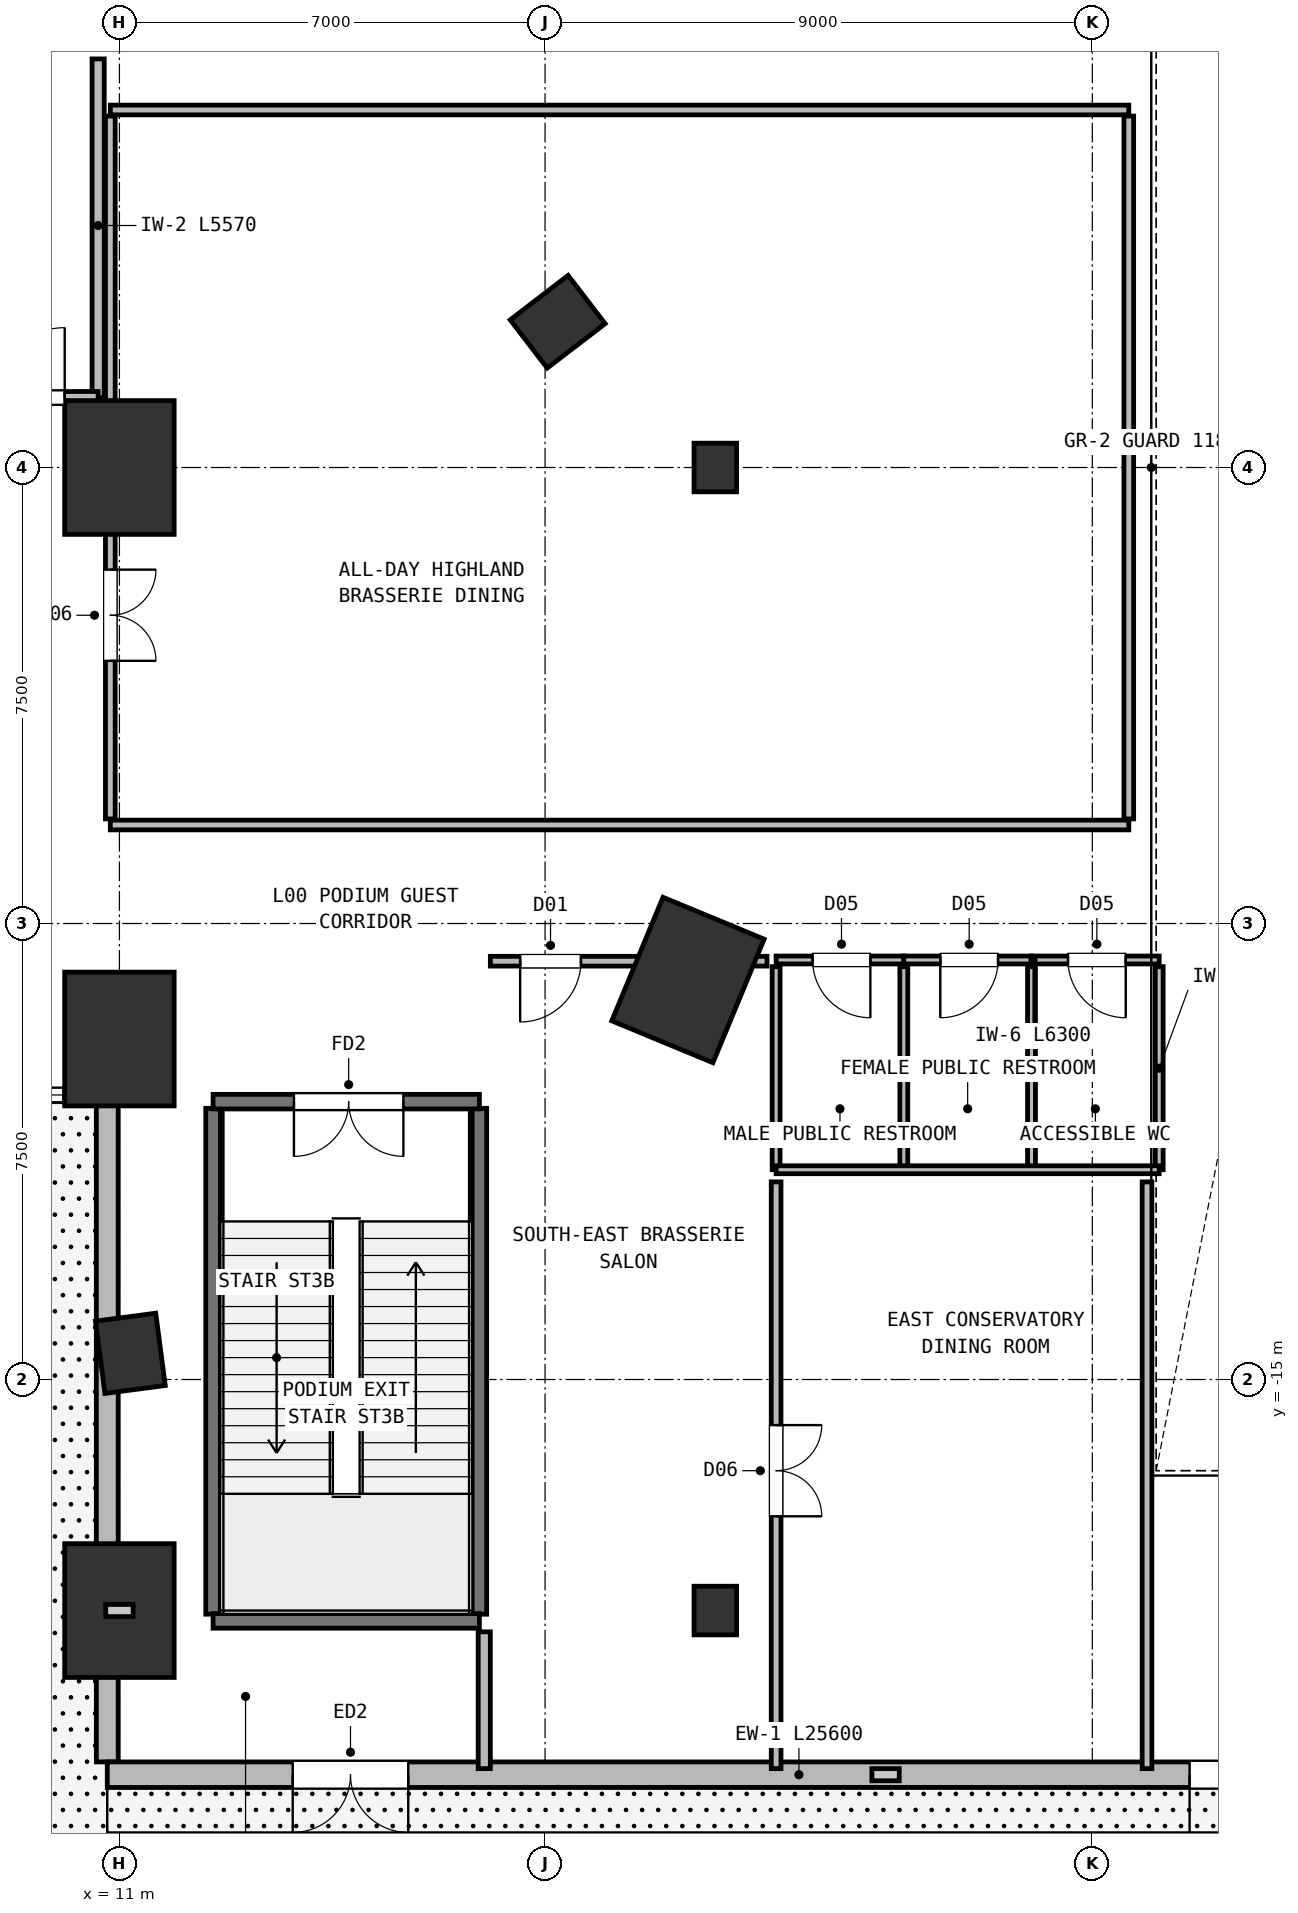
"""IFC4 building model, lengths in metres.
Left out: names, types, materials, properties, quantities, classifications, styles, units other than length and angle.
Written with IfcOpenShell. Run it as: python <this file> out.ifc"""

import sys

from ifc_helpers import new_model, si_unit, direction, frame, frame_2d, origin, origin_2d, place, context, subcontext, project, spatial, rectangle, extrude, element, fill, save


model = new_model("IFC4")
c1 = context("Model", 3, precision=1e-05, world=origin(), true_north=direction((0.0, 1.0)))
c2 = subcontext(c1, "Body", "Model", "MODEL_VIEW")
j1 = project(units=[si_unit("LENGTHUNIT", "METRE"), si_unit("PLANEANGLEUNIT", "RADIAN")], contexts=[c1])
p1 = place(None, origin())
s1 = spatial("IfcSite", under=j1, at=p1, CompositionType="ELEMENT")
p2 = place(p1, origin())
s2 = spatial("IfcBuilding", under=s1, at=p2, CompositionType="ELEMENT")
p3 = place(p2, origin())
s3 = spatial("IfcBuildingStorey", under=s2, at=p3, CompositionType="ELEMENT", Elevation=0.0)
p4 = place(p3, frame((11.179, -14.569, 0.0), z_axis=(0.0, 0.0, 1.0), x_axis=(0.991444861374, 0.13052619222, 0.0)))
e1 = element("IfcColumn", 1, at=p4, inside=s3, PredefinedType="COLUMN", context=c2, shape_type="SweptSolid", body=[
    extrude(rectangle(XDim=1.0, YDim=1.2, at=origin_2d()), origin(), (0.0, 0.0, 1.0), 6.0),
])
p5 = place(p3, frame((20.35, -8.429, 0.0), z_axis=(0.0, 0.0, 1.0), x_axis=(-0.923879532511, 0.382683432365, 0.0)))
e2 = element("IfcColumn", 2, at=p5, inside=s3, PredefinedType="COLUMN", context=c2, shape_type="SweptSolid", body=[
    extrude(rectangle(XDim=1.8, YDim=2.2, at=origin_2d()), origin(), (0.0, 0.0, 1.0), 6.0),
])
p6 = place(p3, frame((18.207, 2.397, 0.0), z_axis=(0.0, 0.0, 1.0), x_axis=(-0.608761429009, 0.793353340291, 0.0)))
e3 = element("IfcColumn", 3, at=p6, inside=s3, PredefinedType="COLUMN", context=c2, shape_type="SweptSolid", body=[
    extrude(rectangle(XDim=1.0, YDim=1.2, at=origin_2d()), origin(), (0.0, 0.0, 1.0), 6.0),
])
for number, where, z_axis, x_axis in (
    (4, (11.0, -18.8, 0.0), (0.0, 0.0, 1.0), (1.0, 0.0, 0.0)),
    (5, (11.0, -9.4, 0.0), (0.0, 0.0, 1.0), (1.0, 0.0, 0.0)),
    (6, (11.0, 0.0, 0.0), (0.0, 0.0, 1.0), (1.0, 0.0, 0.0)),
):
    element("IfcColumn", number, at=place(p3, frame(where, z_axis=z_axis, x_axis=x_axis)), inside=s3, PredefinedType="COLUMN", context=c2, shape_type="SweptSolid", body=[
        extrude(rectangle(XDim=1.8, YDim=2.2, at=origin_2d()), origin(), (0.0, 0.0, 1.0), 6.0),
    ])
for number, where, z_axis, x_axis in (
    (7, (20.8, -18.8, 0.0), (0.0, 0.0, 1.0), (1.0, 0.0, 0.0)),
    (8, (20.8, 0.0, 0.0), (0.0, 0.0, 1.0), (1.0, 0.0, 0.0)),
):
    element("IfcColumn", number, at=place(p3, frame(where, z_axis=z_axis, x_axis=x_axis)), inside=s3, PredefinedType="COLUMN", context=c2, shape_type="SweptSolid", body=[
        extrude(rectangle(XDim=0.7, YDim=0.8, at=origin_2d()), origin(), (0.0, 0.0, 1.0), 6.0),
    ])
p7 = place(p3, frame((10.8, -10.32, 0.0), z_axis=(0.0, 0.0, 1.0), x_axis=(0.0, -1.0, 0.0)))
e9 = element("IfcWall", 9, at=p7, inside=s3, PredefinedType="SOLIDWALL", context=c2, shape_type="SweptSolid", body=[
    extrude(rectangle(XDim=10.97, YDim=0.36, at=frame_2d((5.485, 0.0))), origin(), (0.0, 0.0, 1.0), 5.1),
])
p8 = place(p3, frame((36.4, -21.5, 0.0), z_axis=(0.0, 0.0, 1.0), x_axis=(-1.0, 0.0, 0.0)))
e10 = element("IfcWall", 10, at=p8, inside=s3, PredefinedType="SOLIDWALL", context=c2, shape_type="SweptSolid", body=[
    extrude(rectangle(XDim=25.6, YDim=0.42, at=frame_2d((12.8, 0.0))), origin(), (0.0, 0.0, 1.0), 5.72),
])
p9 = place(p8, frame((5.4, 0.0, 0.0)))
e11 = element("IfcOpeningElement", 11, at=p9, cuts=e10, PredefinedType="OPENING", context=c2, shape_type="SweptSolid", body=[
    extrude(rectangle(XDim=2.4, YDim=2.65, at=frame_2d((1.2, 1.325))), frame((0.0, 0.22, 0.0), z_axis=(0.0, -1.0, 0.0), x_axis=(1.0, 0.0, 0.0)), (0.0, 0.0, 1.0), 0.44),
])
p10 = place(p8, frame((20.65, 0.0, 0.0)))
e12 = element("IfcOpeningElement", 12, at=p10, cuts=e10, PredefinedType="OPENING", context=c2, shape_type="SweptSolid", body=[
    extrude(rectangle(XDim=1.9, YDim=2.35, at=frame_2d((0.95, 1.175))), frame((0.0, 0.22, 0.0), z_axis=(0.0, -1.0, 0.0), x_axis=(1.0, 0.0, 0.0)), (0.0, 0.0, 1.0), 0.44),
])
for number, where, z_axis, x_axis in (
    (13, (12.54, -18.86, 0.0), (0.0, 0.0, 1.0), (0.0, 1.0, 0.0)),
    (14, (16.92, -18.86, 0.0), (0.0, 0.0, 1.0), (0.0, 1.0, 0.0)),
):
    element("IfcWall", number, at=place(p3, frame(where, z_axis=z_axis, x_axis=x_axis)), inside=s3, PredefinedType="SHEAR", context=c2, shape_type="SweptSolid", body=[
        extrude(rectangle(XDim=8.32, YDim=0.24, at=frame_2d((4.16, 0.0))), origin(), (0.0, 0.0, 1.0), 5.72),
    ])
p11 = place(p3, frame((12.54, -18.97, 0.0), z_axis=(0.0, 0.0, 1.0), x_axis=(1.0, 0.0, 0.0)))
e15 = element("IfcWall", 15, at=p11, inside=s3, PredefinedType="SHEAR", context=c2, shape_type="SweptSolid", body=[
    extrude(rectangle(XDim=4.38, YDim=0.24, at=frame_2d((2.19, 0.0))), origin(), (0.0, 0.0, 1.0), 5.72),
])
p12 = place(p3, frame((16.92, -10.43, 0.0), z_axis=(0.0, 0.0, 1.0), x_axis=(-1.0, 0.0, 0.0)))
e16 = element("IfcWall", 16, at=p12, inside=s3, PredefinedType="SHEAR", context=c2, shape_type="SweptSolid", body=[
    extrude(rectangle(XDim=4.38, YDim=0.24, at=frame_2d((2.19, 0.0))), origin(), (0.0, 0.0, 1.0), 5.72),
])
p13 = place(p12, frame((1.25, 0.0, 0.0)))
e17 = element("IfcOpeningElement", 17, at=p13, cuts=e16, PredefinedType="OPENING", context=c2, shape_type="SweptSolid", body=[
    extrude(rectangle(XDim=1.8, YDim=2.2, at=frame_2d((0.9, 1.1))), frame((0.0, 0.13, 0.0), z_axis=(0.0, -1.0, 0.0), x_axis=(1.0, 0.0, 0.0)), (0.0, 0.0, 1.0), 0.26),
])
p14 = place(p3, frame((23.9, -8.1, 0.0), z_axis=(0.0, 0.0, 1.0), x_axis=(-1.0, 0.0, 0.0)))
e18 = element("IfcWall", 18, at=p14, inside=s3, PredefinedType="PARTITIONING", context=c2, shape_type="SweptSolid", body=[
    extrude(rectangle(XDim=2.1, YDim=0.13, at=frame_2d((1.05, 0.0))), origin(), (0.0, 0.0, 1.0), 5.72),
])
p15 = place(p14, frame((0.55, 0.0, 0.0)))
e19 = element("IfcOpeningElement", 19, at=p15, cuts=e18, PredefinedType="OPENING", context=c2, shape_type="SweptSolid", body=[
    extrude(rectangle(XDim=0.95, YDim=2.1, at=frame_2d((0.475, 1.05))), frame((0.0, 0.075, 0.0), z_axis=(0.0, -1.0, 0.0), x_axis=(1.0, 0.0, 0.0)), (0.0, 0.0, 1.0), 0.15),
])
p16 = place(p3, frame((21.8, -11.55, 0.0), z_axis=(0.0, 0.0, 1.0), x_axis=(0.0, 1.0, 0.0)))
e20 = element("IfcWall", 20, at=p16, inside=s3, PredefinedType="PARTITIONING", context=c2, shape_type="SweptSolid", body=[
    extrude(rectangle(XDim=3.34, YDim=0.13, at=frame_2d((1.67, 0.0))), origin(), (0.0, 0.0, 1.0), 5.72),
])
p17 = place(p3, frame((26.0, -8.1, 0.0), z_axis=(0.0, 0.0, 1.0), x_axis=(-1.0, 0.0, 0.0)))
e21 = element("IfcWall", 21, at=p17, inside=s3, PredefinedType="PARTITIONING", context=c2, shape_type="SweptSolid", body=[
    extrude(rectangle(XDim=2.1, YDim=0.13, at=frame_2d((1.05, 0.0))), origin(), (0.0, 0.0, 1.0), 5.72),
])
p18 = place(p17, frame((0.55, 0.0, 0.0)))
e22 = element("IfcOpeningElement", 22, at=p18, cuts=e21, PredefinedType="OPENING", context=c2, shape_type="SweptSolid", body=[
    extrude(rectangle(XDim=0.95, YDim=2.1, at=frame_2d((0.475, 1.05))), frame((0.0, 0.075, 0.0), z_axis=(0.0, -1.0, 0.0), x_axis=(1.0, 0.0, 0.0)), (0.0, 0.0, 1.0), 0.15),
])
p19 = place(p3, frame((23.9, -11.55, 0.0), z_axis=(0.0, 0.0, 1.0), x_axis=(0.0, 1.0, 0.0)))
e23 = element("IfcWall", 23, at=p19, inside=s3, PredefinedType="PARTITIONING", context=c2, shape_type="SweptSolid", body=[
    extrude(rectangle(XDim=3.34, YDim=0.13, at=frame_2d((1.67, 0.0))), origin(), (0.0, 0.0, 1.0), 5.72),
])
p20 = place(p3, frame((28.1, -8.1, 0.0), z_axis=(0.0, 0.0, 1.0), x_axis=(-1.0, 0.0, 0.0)))
e24 = element("IfcWall", 24, at=p20, inside=s3, PredefinedType="PARTITIONING", context=c2, shape_type="SweptSolid", body=[
    extrude(rectangle(XDim=2.1, YDim=0.13, at=frame_2d((1.05, 0.0))), origin(), (0.0, 0.0, 1.0), 5.72),
])
p21 = place(p20, frame((0.55, 0.0, 0.0)))
e25 = element("IfcOpeningElement", 25, at=p21, cuts=e24, PredefinedType="OPENING", context=c2, shape_type="SweptSolid", body=[
    extrude(rectangle(XDim=0.95, YDim=2.1, at=frame_2d((0.475, 1.05))), frame((0.0, 0.075, 0.0), z_axis=(0.0, -1.0, 0.0), x_axis=(1.0, 0.0, 0.0)), (0.0, 0.0, 1.0), 0.15),
])
for number, where, z_axis, x_axis in (
    (26, (26.0, -11.55, 0.0), (0.0, 0.0, 1.0), (0.0, 1.0, 0.0)),
    (27, (28.1, -11.55, 0.0), (0.0, 0.0, 1.0), (0.0, 1.0, 0.0)),
):
    element("IfcWall", number, at=place(p3, frame(where, z_axis=z_axis, x_axis=x_axis)), inside=s3, PredefinedType="PARTITIONING", context=c2, shape_type="SweptSolid", body=[
        extrude(rectangle(XDim=3.34, YDim=0.13, at=frame_2d((1.67, 0.0))), origin(), (0.0, 0.0, 1.0), 5.72),
    ])
p22 = place(p3, frame((21.8, -11.55, 0.0), z_axis=(0.0, 0.0, 1.0), x_axis=(1.0, 0.0, 0.0)))
e28 = element("IfcWall", 28, at=p22, inside=s3, PredefinedType="PARTITIONING", context=c2, shape_type="SweptSolid", body=[
    extrude(rectangle(XDim=6.3, YDim=0.13, at=frame_2d((3.15, 0.0))), origin(), (0.0, 0.0, 1.0), 5.72),
])
for number, where, z_axis, x_axis in (
    (29, (27.6, 5.88, 0.0), (0.0, 0.0, 1.0), (-1.0, 0.0, 0.0)),
    (30, (10.85, -5.88, 0.0), (0.0, 0.0, 1.0), (1.0, 0.0, 0.0)),
):
    element("IfcWall", number, at=place(p3, frame(where, z_axis=z_axis, x_axis=x_axis)), inside=s3, PredefinedType="PARTITIONING", context=c2, shape_type="SweptSolid", body=[
        extrude(rectangle(XDim=16.75, YDim=0.16, at=frame_2d((8.375, 0.0))), origin(), (0.0, 0.0, 1.0), 5.72),
    ])
p23 = place(p3, frame((10.85, 5.78, 0.0), z_axis=(0.0, 0.0, 1.0), x_axis=(0.0, -1.0, 0.0)))
e31 = element("IfcWall", 31, at=p23, inside=s3, PredefinedType="PARTITIONING", context=c2, shape_type="SweptSolid", body=[
    extrude(rectangle(XDim=11.56, YDim=0.16, at=frame_2d((5.78, 0.0))), origin(), (0.0, 0.0, 1.0), 5.1),
])
p24 = place(p23, frame((7.46, 0.0, 0.0)))
e32 = element("IfcOpeningElement", 32, at=p24, cuts=e31, PredefinedType="OPENING", context=c2, shape_type="SweptSolid", body=[
    extrude(rectangle(XDim=1.5, YDim=2.2, at=frame_2d((0.75, 1.1))), frame((0.0, 0.09, 0.0), z_axis=(0.0, -1.0, 0.0), x_axis=(1.0, 0.0, 0.0)), (0.0, 0.0, 1.0), 0.18),
])
p25 = place(p3, frame((27.6, -5.78, 0.0), z_axis=(0.0, 0.0, 1.0), x_axis=(0.0, 1.0, 0.0)))
e33 = element("IfcWall", 33, at=p25, inside=s3, PredefinedType="PARTITIONING", context=c2, shape_type="SweptSolid", body=[
    extrude(rectangle(XDim=11.56, YDim=0.16, at=frame_2d((5.78, 0.0))), origin(), (0.0, 0.0, 1.0), 5.72),
])
p26 = place(p3, frame((21.8, -11.75, 0.0), z_axis=(0.0, 0.0, 1.0), x_axis=(0.0, -1.0, 0.0)))
e34 = element("IfcWall", 34, at=p26, inside=s3, PredefinedType="PARTITIONING", context=c2, shape_type="SweptSolid", body=[
    extrude(rectangle(XDim=9.65, YDim=0.16, at=frame_2d((4.825, 0.0))), origin(), (0.0, 0.0, 1.0), 5.72),
])
p27 = place(p26, frame((4.0, 0.0, 0.0)))
e35 = element("IfcOpeningElement", 35, at=p27, cuts=e34, PredefinedType="OPENING", context=c2, shape_type="SweptSolid", body=[
    extrude(rectangle(XDim=1.5, YDim=2.2, at=frame_2d((0.75, 1.1))), frame((0.0, 0.09, 0.0), z_axis=(0.0, -1.0, 0.0), x_axis=(1.0, 0.0, 0.0)), (0.0, 0.0, 1.0), 0.18),
])
p28 = place(p3, frame((27.9, -21.4, 0.0), z_axis=(0.0, 0.0, 1.0), x_axis=(0.0, 1.0, 0.0)))
e36 = element("IfcWall", 36, at=p28, inside=s3, PredefinedType="PARTITIONING", context=c2, shape_type="SweptSolid", body=[
    extrude(rectangle(XDim=9.65, YDim=0.16, at=frame_2d((4.825, 0.0))), origin(), (0.0, 0.0, 1.0), 5.72),
])
p29 = place(p3, frame((21.65, -8.12, 0.0), z_axis=(0.0, 0.0, 1.0), x_axis=(-1.0, 0.0, 0.0)))
e37 = element("IfcWall", 37, at=p29, inside=s3, PredefinedType="PARTITIONING", context=c2, shape_type="SweptSolid", body=[
    extrude(rectangle(XDim=4.55, YDim=0.16, at=frame_2d((2.275, 0.0))), origin(), (0.0, 0.0, 1.0), 5.15),
])
p30 = place(p29, frame((3.06, 0.0, 0.0)))
e38 = element("IfcOpeningElement", 38, at=p30, cuts=e37, PredefinedType="OPENING", context=c2, shape_type="SweptSolid", body=[
    extrude(rectangle(XDim=1.0, YDim=2.15, at=frame_2d((0.5, 1.075))), frame((0.0, 0.09, 0.0), z_axis=(0.0, -1.0, 0.0), x_axis=(1.0, 0.0, 0.0)), (0.0, 0.0, 1.0), 0.18),
])
p31 = place(p3, frame((17.0, -21.4, 0.0), z_axis=(0.0, 0.0, 1.0), x_axis=(0.0, 1.0, 0.0)))
e39 = element("IfcWall", 39, at=p31, inside=s3, PredefinedType="PARTITIONING", context=c2, shape_type="SweptSolid", body=[
    extrude(rectangle(XDim=2.25, YDim=0.2, at=frame_2d((1.125, 0.0))), origin(), (0.0, 0.0, 1.0), 5.72),
])
p32 = place(p3, frame((10.65, 1.15, 0.0), z_axis=(0.0, 0.0, 1.0), x_axis=(0.0, 1.0, 0.0)))
e40 = element("IfcWall", 40, at=p32, inside=s3, PredefinedType="PARTITIONING", context=c2, shape_type="SweptSolid", body=[
    extrude(rectangle(XDim=5.57, YDim=0.2, at=frame_2d((2.785, 0.0))), origin(), (0.0, 0.0, 1.0), 5.72),
])
p33 = place(p3, frame((8.4, 1.15, 0.0), z_axis=(0.0, 0.0, 1.0), x_axis=(1.0, 0.0, 0.0)))
e41 = element("IfcWall", 41, at=p33, inside=s3, PredefinedType="PARTITIONING", context=c2, shape_type="SweptSolid", body=[
    extrude(rectangle(XDim=2.25, YDim=0.2, at=frame_2d((1.125, 0.0))), origin(), (0.0, 0.0, 1.0), 5.72),
])
p34 = place(p33, frame((0.55, 0.0, 0.0)))
e42 = element("IfcOpeningElement", 42, at=p34, cuts=e41, PredefinedType="OPENING", context=c2, shape_type="SweptSolid", body=[
    extrude(rectangle(XDim=1.15, YDim=2.15, at=frame_2d((0.575, 1.075))), frame((0.0, 0.11, 0.0), z_axis=(0.0, -1.0, 0.0), x_axis=(1.0, 0.0, 0.0)), (0.0, 0.0, 1.0), 0.22),
])
p35 = place(p9, origin())
e43 = element("IfcDoor", 43, at=p35, inside=s3, OperationType="DOUBLE_DOOR_SINGLE_SWING", PredefinedType="DOOR", context=c2, shape_type="SweptSolid", body=[
    extrude(rectangle(XDim=2.4, YDim=2.65, at=frame_2d((1.2, 1.325))), frame((0.0, 0.025, 0.0), z_axis=(0.0, -1.0, 0.0), x_axis=(1.0, 0.0, 0.0)), (0.0, 0.0, 1.0), 0.05),
])
fill(e11, e43)
p36 = place(p10, origin())
e44 = element("IfcDoor", 44, at=p36, inside=s3, OperationType="DOUBLE_DOOR_SINGLE_SWING", PredefinedType="DOOR", context=c2, shape_type="SweptSolid", body=[
    extrude(rectangle(XDim=1.9, YDim=2.35, at=frame_2d((0.95, 1.175))), frame((0.0, 0.025, 0.0), z_axis=(0.0, -1.0, 0.0), x_axis=(1.0, 0.0, 0.0)), (0.0, 0.0, 1.0), 0.05),
])
fill(e12, e44)
p37 = place(p13, origin())
e45 = element("IfcDoor", 45, at=p37, inside=s3, OperationType="DOUBLE_DOOR_SINGLE_SWING", PredefinedType="DOOR", context=c2, shape_type="SweptSolid", body=[
    extrude(rectangle(XDim=1.8, YDim=2.2, at=frame_2d((0.9, 1.1))), frame((0.0, 0.025, 0.0), z_axis=(0.0, -1.0, 0.0), x_axis=(1.0, 0.0, 0.0)), (0.0, 0.0, 1.0), 0.05),
])
fill(e17, e45)
p38 = place(p15, origin())
e46 = element("IfcDoor", 46, at=p38, inside=s3, OperationType="SINGLE_SWING_LEFT", PredefinedType="DOOR", context=c2, shape_type="SweptSolid", body=[
    extrude(rectangle(XDim=0.95, YDim=2.1, at=frame_2d((0.475, 1.05))), frame((0.0, 0.025, 0.0), z_axis=(0.0, -1.0, 0.0), x_axis=(1.0, 0.0, 0.0)), (0.0, 0.0, 1.0), 0.05),
])
fill(e19, e46)
p39 = place(p18, origin())
e47 = element("IfcDoor", 47, at=p39, inside=s3, OperationType="SINGLE_SWING_RIGHT", PredefinedType="DOOR", context=c2, shape_type="SweptSolid", body=[
    extrude(rectangle(XDim=0.95, YDim=2.1, at=frame_2d((0.475, 1.05))), frame((0.0, 0.025, 0.0), z_axis=(0.0, -1.0, 0.0), x_axis=(1.0, 0.0, 0.0)), (0.0, 0.0, 1.0), 0.05),
])
fill(e22, e47)
p40 = place(p21, origin())
e48 = element("IfcDoor", 48, at=p40, inside=s3, OperationType="SINGLE_SWING_LEFT", PredefinedType="DOOR", context=c2, shape_type="SweptSolid", body=[
    extrude(rectangle(XDim=0.95, YDim=2.1, at=frame_2d((0.475, 1.05))), frame((0.0, 0.025, 0.0), z_axis=(0.0, -1.0, 0.0), x_axis=(1.0, 0.0, 0.0)), (0.0, 0.0, 1.0), 0.05),
])
fill(e25, e48)
p41 = place(p24, origin())
e49 = element("IfcDoor", 49, at=p41, inside=s3, OperationType="DOUBLE_DOOR_SINGLE_SWING", PredefinedType="DOOR", context=c2, shape_type="SweptSolid", body=[
    extrude(rectangle(XDim=1.5, YDim=2.2, at=frame_2d((0.75, 1.1))), frame((0.0, 0.025, 0.0), z_axis=(0.0, -1.0, 0.0), x_axis=(1.0, 0.0, 0.0)), (0.0, 0.0, 1.0), 0.05),
])
fill(e32, e49)
p42 = place(p27, origin())
e50 = element("IfcDoor", 50, at=p42, inside=s3, OperationType="DOUBLE_DOOR_SINGLE_SWING", PredefinedType="DOOR", context=c2, shape_type="SweptSolid", body=[
    extrude(rectangle(XDim=1.5, YDim=2.2, at=frame_2d((0.75, 1.1))), frame((0.0, 0.025, 0.0), z_axis=(0.0, -1.0, 0.0), x_axis=(1.0, 0.0, 0.0)), (0.0, 0.0, 1.0), 0.05),
])
fill(e35, e50)
p43 = place(p30, origin())
e51 = element("IfcDoor", 51, at=p43, inside=s3, OperationType="SINGLE_SWING_RIGHT", PredefinedType="DOOR", context=c2, shape_type="SweptSolid", body=[
    extrude(rectangle(XDim=1.0, YDim=2.15, at=frame_2d((0.5, 1.075))), frame((0.0, 0.025, 0.0), z_axis=(0.0, -1.0, 0.0), x_axis=(1.0, 0.0, 0.0)), (0.0, 0.0, 1.0), 0.05),
])
fill(e38, e51)
p44 = place(p34, origin())
e52 = element("IfcDoor", 52, at=p44, inside=s3, OperationType="SINGLE_SWING_RIGHT", PredefinedType="DOOR", context=c2, shape_type="SweptSolid", body=[
    extrude(rectangle(XDim=1.15, YDim=2.15, at=frame_2d((0.575, 1.075))), frame((0.0, 0.025, 0.0), z_axis=(0.0, -1.0, 0.0), x_axis=(1.0, 0.0, 0.0)), (0.0, 0.0, 1.0), 0.05),
])
fill(e42, e52)
save(model, sys.argv[1])
